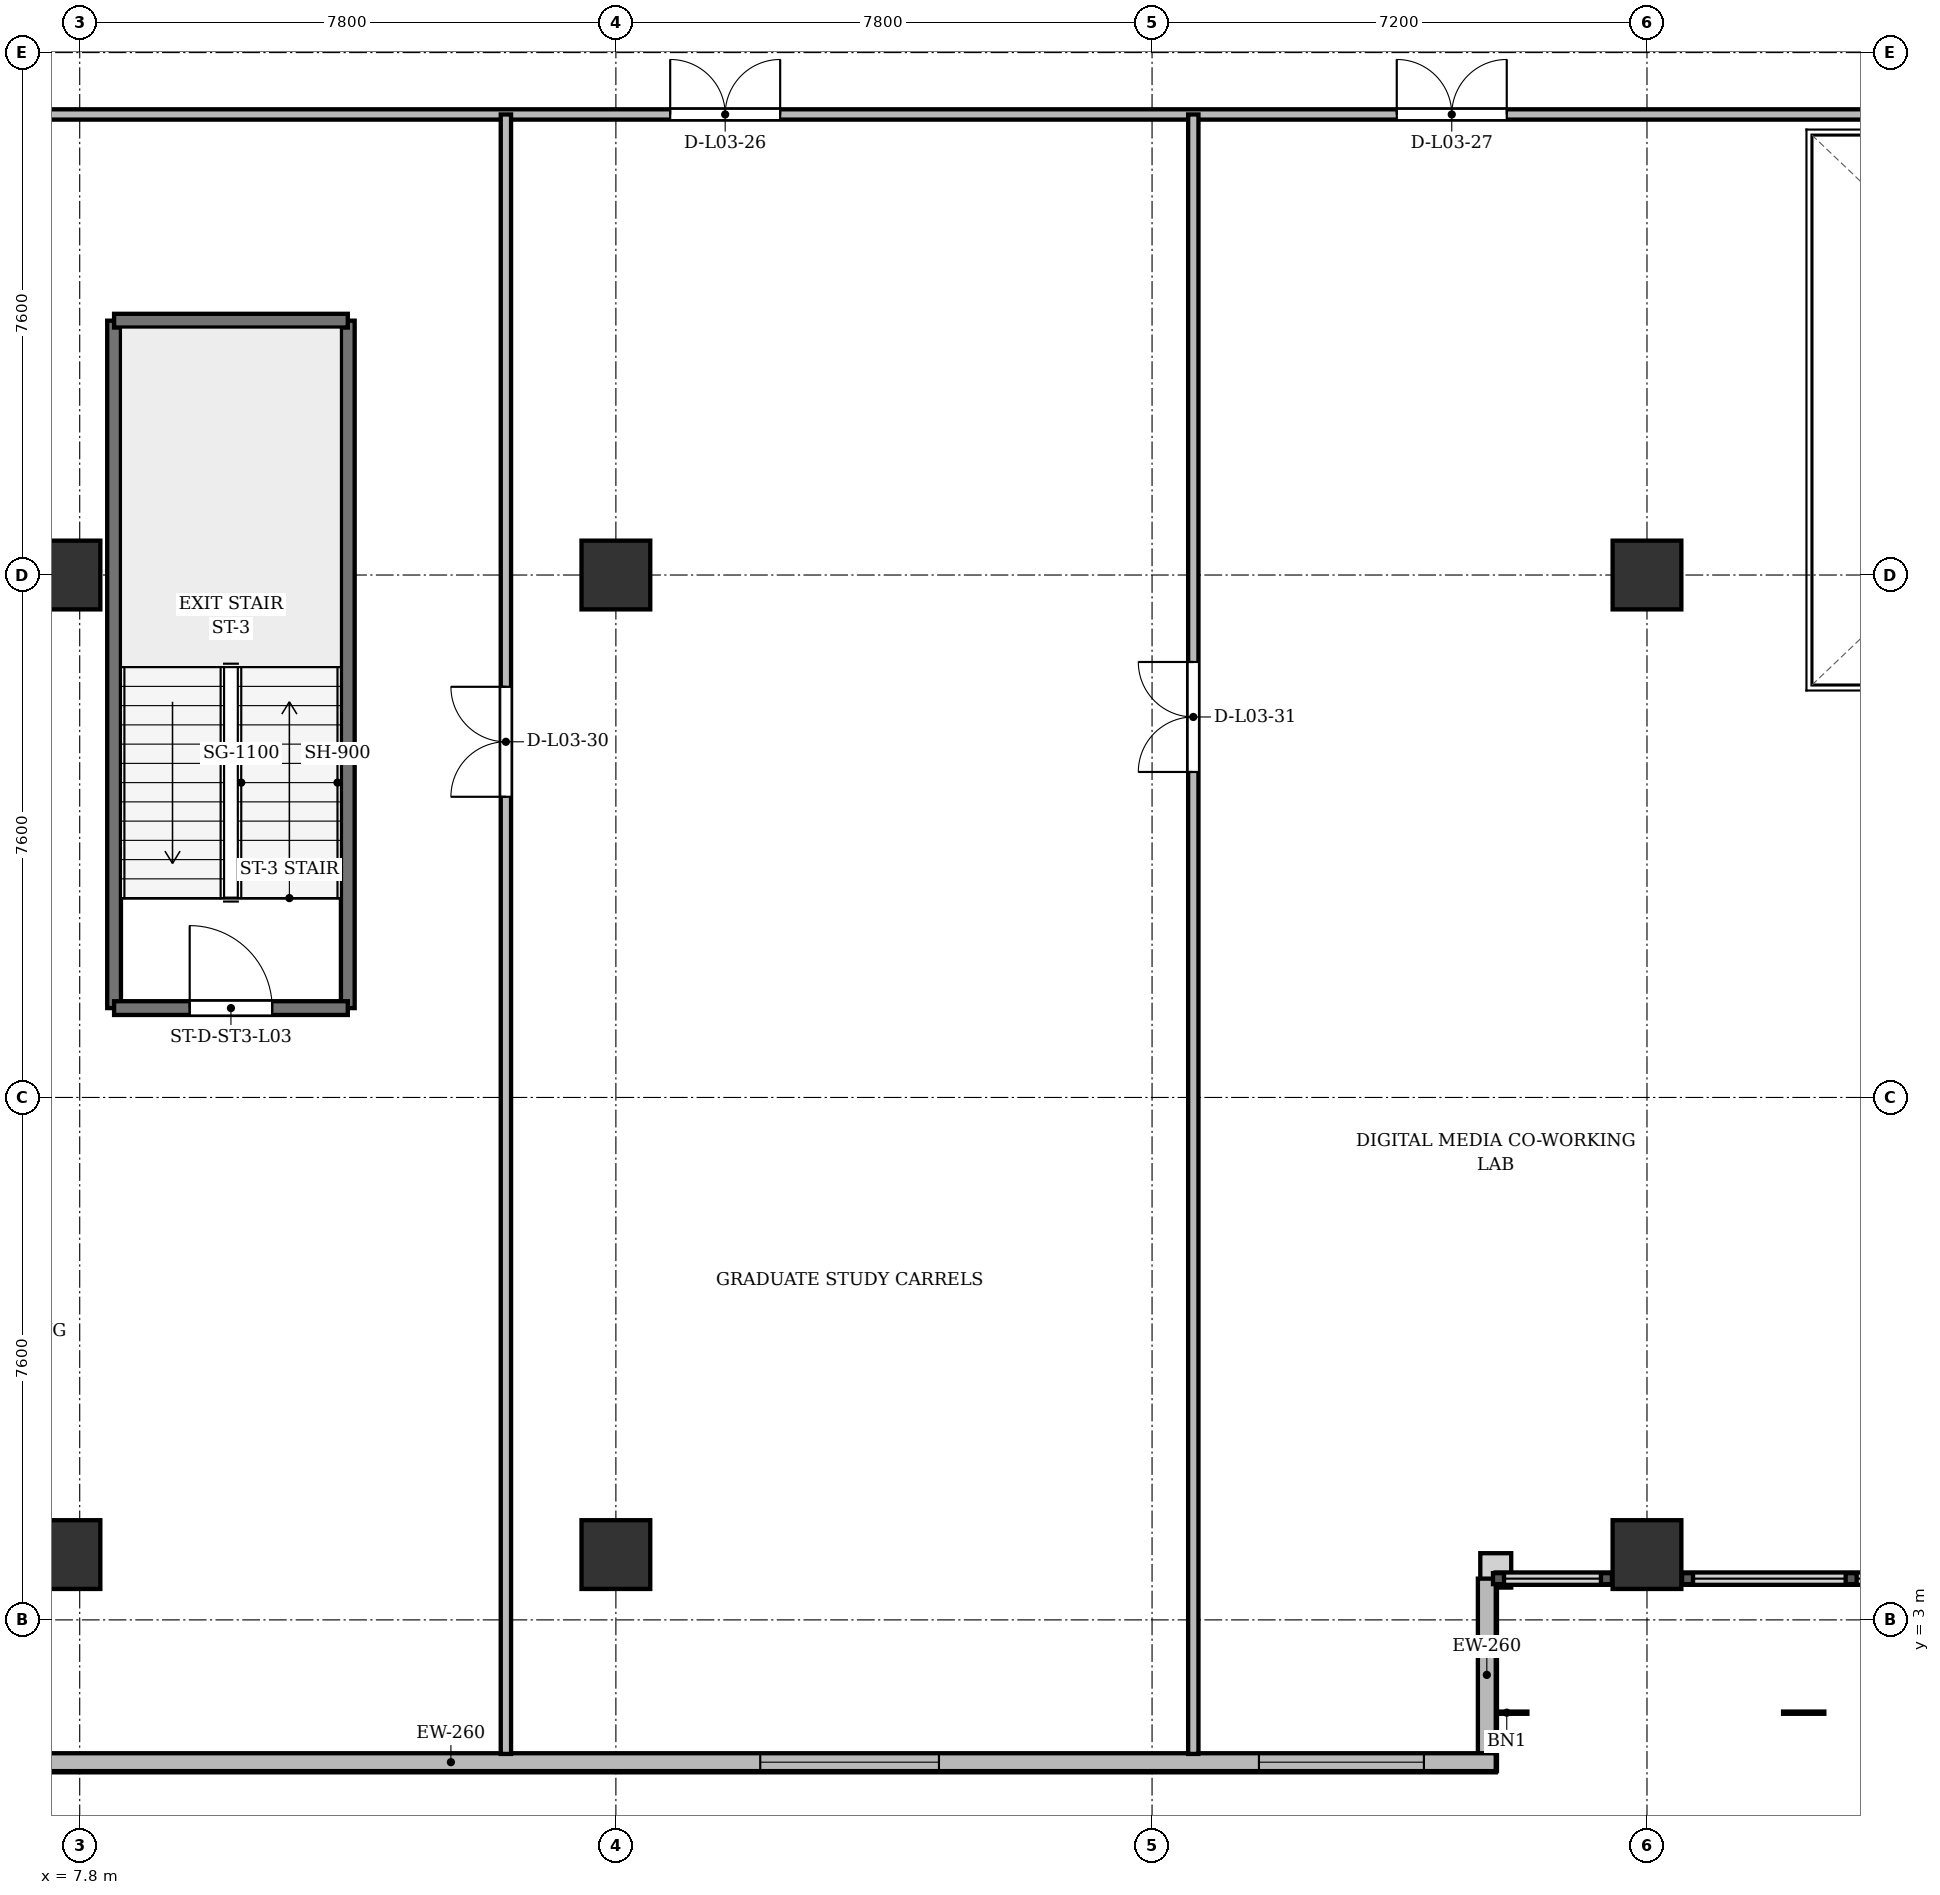
"""IFC4 building model, lengths in metres.
Left out: names, types, materials, properties, quantities, classifications, styles, units other than length and angle.
Written with IfcOpenShell. Run it as: python <this file> out.ifc"""

import sys

from ifc_helpers import new_model, si_unit, direction, frame, frame_2d, origin, origin_2d, place, context, subcontext, project, spatial, rectangle, extrude, source, transform, mapped, element, fill, save


model = new_model("IFC4")
c1 = context("Model", 3, precision=1e-05, world=origin(), true_north=direction((0.0, 1.0)))
c2 = subcontext(c1, "Body", "Model", "MODEL_VIEW")
j1 = project(units=[si_unit("LENGTHUNIT", "METRE"), si_unit("PLANEANGLEUNIT", "RADIAN")], contexts=[c1])
p1 = place(None, origin())
s1 = spatial("IfcSite", under=j1, at=p1, CompositionType="ELEMENT")
p2 = place(p1, origin())
s2 = spatial("IfcBuilding", under=s1, at=p2, CompositionType="ELEMENT")
p3 = place(p2, frame((0.0, 0.0, 14.2)))
s3 = spatial("IfcBuildingStorey", under=s2, at=p3, CompositionType="ELEMENT", Elevation=14.2)
m1 = source(origin(), c2, "Body", "SweptSolid", [
    extrude(rectangle(XDim=1.0, YDim=1.0, at=origin_2d()), origin(), (0.0, 0.0, 1.0), 4.5),
])
for number, where, z_axis, x_axis in (
    (1, (7.6, 3.95, 0.0), (0.0, 0.0, 1.0), (1.0, 0.0, 0.0)),
    (2, (7.6, 18.2, 0.0), (0.0, 0.0, 1.0), (1.0, 0.0, 0.0)),
    (3, (15.6, 3.95, 0.0), (0.0, 0.0, 1.0), (1.0, 0.0, 0.0)),
    (4, (15.6, 18.2, 0.0), (0.0, 0.0, 1.0), (1.0, 0.0, 0.0)),
    (5, (30.6, 3.95, 0.0), (0.0, 0.0, 1.0), (1.0, 0.0, 0.0)),
    (6, (30.6, 18.2, 0.0), (0.0, 0.0, 1.0), (1.0, 0.0, 0.0)),
):
    element("IfcColumn", number, at=place(p3, frame(where, z_axis=z_axis, x_axis=x_axis)), inside=s3, PredefinedType="COLUMN", context=c2, shape_type="MappedRepresentation", body=[
        mapped(m1, transform((0.0, 0.0, 0.0), x_axis=(1.0, 0.0, 0.0), y_axis=(0.0, 1.0, 0.0), z_axis=(0.0, 0.0, 1.0), scale=1.0)),
    ])
p4 = place(p3, frame((28.27, 3.6, 0.0), z_axis=(0.0, 0.0, 1.0), x_axis=(0.0, -1.0, 0.0)))
e7 = element("IfcWall", 7, at=p4, inside=s3, PredefinedType="SOLIDWALL", context=c2, shape_type="SweptSolid", body=[
    extrude(rectangle(XDim=2.8, YDim=0.26, at=frame_2d((1.4, 0.0))), origin(), (0.0, 0.0, 1.0), 4.15),
])
p5 = place(p3, frame((28.4, 0.93, 0.0), z_axis=(0.0, 0.0, 1.0), x_axis=(-1.0, 0.0, 0.0)))
e8 = element("IfcWall", 8, at=p5, inside=s3, PredefinedType="SOLIDWALL", context=c2, shape_type="SweptSolid", body=[
    extrude(rectangle(XDim=30.4, YDim=0.26, at=frame_2d((15.2, 0.0))), origin(), (0.0, 0.0, 1.0), 4.15),
])
p6 = place(p5, frame((1.045, 0.0, 0.9)))
e9 = element("IfcOpeningElement", 9, at=p6, cuts=e8, PredefinedType="OPENING", context=c2, shape_type="SweptSolid", body=[
    extrude(rectangle(XDim=2.4, YDim=2.1, at=frame_2d((1.2, 1.05))), frame((0.0, 0.14, 0.0), z_axis=(0.0, -1.0, 0.0), x_axis=(1.0, 0.0, 0.0)), (0.0, 0.0, 1.0), 0.28),
])
p7 = place(p5, frame((8.1, 0.0, 0.9)))
e10 = element("IfcOpeningElement", 10, at=p7, cuts=e8, PredefinedType="OPENING", context=c2, shape_type="SweptSolid", body=[
    extrude(rectangle(XDim=2.6, YDim=1.9, at=frame_2d((1.3, 0.95))), frame((0.0, 0.14, 0.0), z_axis=(0.0, -1.0, 0.0), x_axis=(1.0, 0.0, 0.0)), (0.0, 0.0, 1.0), 0.28),
])
p8 = place(p5, frame((21.155, 0.0, 0.9)))
e11 = element("IfcOpeningElement", 11, at=p8, cuts=e8, PredefinedType="OPENING", context=c2, shape_type="SweptSolid", body=[
    extrude(rectangle(XDim=2.4, YDim=2.1, at=frame_2d((1.2, 1.05))), frame((0.0, 0.14, 0.0), z_axis=(0.0, -1.0, 0.0), x_axis=(1.0, 0.0, 0.0)), (0.0, 0.0, 1.0), 0.28),
])
for number, where, z_axis, x_axis in (
    (12, (8.3, 11.9, 0.0), (0.0, 0.0, 1.0), (0.0, 1.0, 0.0)),
    (13, (11.7, 11.9, 0.0), (0.0, 0.0, 1.0), (0.0, 1.0, 0.0)),
):
    element("IfcWall", number, at=place(p3, frame(where, z_axis=z_axis, x_axis=x_axis)), inside=s3, PredefinedType="SHEAR", context=c2, shape_type="SweptSolid", body=[
        extrude(rectangle(XDim=10.0, YDim=0.2, at=frame_2d((5.0, 0.0))), origin(), (0.0, 0.0, 1.0), 4.15),
    ])
p9 = place(p3, frame((8.3, 11.9, 0.0), z_axis=(0.0, 0.0, 1.0), x_axis=(1.0, 0.0, 0.0)))
e14 = element("IfcWall", 14, at=p9, inside=s3, PredefinedType="SHEAR", context=c2, shape_type="SweptSolid", body=[
    extrude(rectangle(XDim=3.4, YDim=0.2, at=frame_2d((1.7, 0.0))), origin(), (0.0, 0.0, 1.0), 4.15),
])
p10 = place(p9, frame((1.1, 0.0, 0.0)))
e15 = element("IfcOpeningElement", 15, at=p10, cuts=e14, PredefinedType="OPENING", context=c2, shape_type="SweptSolid", body=[
    extrude(rectangle(XDim=1.2, YDim=2.15, at=frame_2d((0.6, 1.075))), frame((0.0, 0.11, 0.0), z_axis=(0.0, -1.0, 0.0), x_axis=(1.0, 0.0, 0.0)), (0.0, 0.0, 1.0), 0.22),
])
p11 = place(p3, frame((8.3, 21.9, 0.0), z_axis=(0.0, 0.0, 1.0), x_axis=(1.0, 0.0, 0.0)))
e16 = element("IfcWall", 16, at=p11, inside=s3, PredefinedType="SHEAR", context=c2, shape_type="SweptSolid", body=[
    extrude(rectangle(XDim=3.4, YDim=0.2, at=frame_2d((1.7, 0.0))), origin(), (0.0, 0.0, 1.0), 4.15),
])
p12 = place(p3, frame((-1.75, 24.9, 0.0), z_axis=(0.0, 0.0, 1.0), x_axis=(1.0, 0.0, 0.0)))
e17 = element("IfcWall", 17, at=p12, inside=s3, PredefinedType="PARTITIONING", context=c2, shape_type="SweptSolid", body=[
    extrude(rectangle(XDim=77.9, YDim=0.15, at=frame_2d((38.95, 0.0))), origin(), (0.0, 0.0, 1.0), 3.35),
])
p13 = place(p12, frame((1.952, 0.0, 0.0)))
e18 = element("IfcOpeningElement", 18, at=p13, cuts=e17, PredefinedType="OPENING", context=c2, shape_type="SweptSolid", body=[
    extrude(rectangle(XDim=1.6, YDim=2.2, at=frame_2d((0.8, 1.1))), frame((0.0, 0.085, 0.0), z_axis=(0.0, -1.0, 0.0), x_axis=(1.0, 0.0, 0.0)), (0.0, 0.0, 1.0), 0.17),
])
p14 = place(p12, frame((18.14, 0.0, 0.0)))
e19 = element("IfcOpeningElement", 19, at=p14, cuts=e17, PredefinedType="OPENING", context=c2, shape_type="SweptSolid", body=[
    extrude(rectangle(XDim=1.6, YDim=2.2, at=frame_2d((0.8, 1.1))), frame((0.0, 0.085, 0.0), z_axis=(0.0, -1.0, 0.0), x_axis=(1.0, 0.0, 0.0)), (0.0, 0.0, 1.0), 0.17),
])
p15 = place(p12, frame((28.71, 0.0, 0.0)))
e20 = element("IfcOpeningElement", 20, at=p15, cuts=e17, PredefinedType="OPENING", context=c2, shape_type="SweptSolid", body=[
    extrude(rectangle(XDim=1.6, YDim=2.2, at=frame_2d((0.8, 1.1))), frame((0.0, 0.085, 0.0), z_axis=(0.0, -1.0, 0.0), x_axis=(1.0, 0.0, 0.0)), (0.0, 0.0, 1.0), 0.17),
])
p16 = place(p12, frame((53.857, 0.0, 0.0)))
e21 = element("IfcOpeningElement", 21, at=p16, cuts=e17, PredefinedType="OPENING", context=c2, shape_type="SweptSolid", body=[
    extrude(rectangle(XDim=1.6, YDim=2.2, at=frame_2d((0.8, 1.1))), frame((0.0, 0.085, 0.0), z_axis=(0.0, -1.0, 0.0), x_axis=(1.0, 0.0, 0.0)), (0.0, 0.0, 1.0), 0.17),
])
p17 = place(p12, frame((74.351, 0.0, 0.0)))
e22 = element("IfcOpeningElement", 22, at=p17, cuts=e17, PredefinedType="OPENING", context=c2, shape_type="SweptSolid", body=[
    extrude(rectangle(XDim=1.6, YDim=2.2, at=frame_2d((0.8, 1.1))), frame((0.0, 0.085, 0.0), z_axis=(0.0, -1.0, 0.0), x_axis=(1.0, 0.0, 0.0)), (0.0, 0.0, 1.0), 0.17),
])
p18 = place(p3, frame((14.0, 1.05, 0.0), z_axis=(0.0, 0.0, 1.0), x_axis=(0.0, 1.0, 0.0)))
e23 = element("IfcWall", 23, at=p18, inside=s3, PredefinedType="PARTITIONING", context=c2, shape_type="SweptSolid", body=[
    extrude(rectangle(XDim=23.85, YDim=0.15, at=frame_2d((11.925, 0.0))), origin(), (0.0, 0.0, 1.0), 3.05),
])
p19 = place(p18, frame((13.924, 0.0, 0.0)))
e24 = element("IfcOpeningElement", 24, at=p19, cuts=e23, PredefinedType="OPENING", context=c2, shape_type="SweptSolid", body=[
    extrude(rectangle(XDim=1.6, YDim=2.2, at=frame_2d((0.8, 1.1))), frame((0.0, 0.085, 0.0), z_axis=(0.0, -1.0, 0.0), x_axis=(1.0, 0.0, 0.0)), (0.0, 0.0, 1.0), 0.17),
])
p20 = place(p3, frame((24.0, 1.05, 0.0), z_axis=(0.0, 0.0, 1.0), x_axis=(0.0, 1.0, 0.0)))
e25 = element("IfcWall", 25, at=p20, inside=s3, PredefinedType="PARTITIONING", context=c2, shape_type="SweptSolid", body=[
    extrude(rectangle(XDim=23.85, YDim=0.15, at=frame_2d((11.925, 0.0))), origin(), (0.0, 0.0, 1.0), 3.05),
])
p21 = place(p20, frame((14.285, 0.0, 0.0)))
e26 = element("IfcOpeningElement", 26, at=p21, cuts=e25, PredefinedType="OPENING", context=c2, shape_type="SweptSolid", body=[
    extrude(rectangle(XDim=1.6, YDim=2.2, at=frame_2d((0.8, 1.1))), frame((0.0, 0.085, 0.0), z_axis=(0.0, -1.0, 0.0), x_axis=(1.0, 0.0, 0.0)), (0.0, 0.0, 1.0), 0.17),
])
m2 = source(origin(), c2, "Body", "SweptSolid", [
    extrude(rectangle(XDim=2.4, YDim=2.1, at=frame_2d((1.2, 1.05))), frame((0.0, 0.03, 0.0), z_axis=(0.0, -1.0, 0.0), x_axis=(1.0, 0.0, 0.0)), (0.0, 0.0, 1.0), 0.06),
])
p22 = place(p6, origin())
e27 = element("IfcWindow", 27, at=p22, inside=s3, PartitioningType="SINGLE_PANEL", PredefinedType="WINDOW", context=c2, shape_type="MappedRepresentation", body=[
    mapped(m2, transform((0.0, 0.0, 0.0), x_axis=(1.0, 0.0, 0.0), y_axis=(0.0, 1.0, 0.0), z_axis=(0.0, 0.0, 1.0), scale=1.0)),
])
fill(e9, e27)
m3 = source(origin(), c2, "Body", "SweptSolid", [
    extrude(rectangle(XDim=2.6, YDim=1.9, at=frame_2d((1.3, 0.95))), frame((0.0, 0.03, 0.0), z_axis=(0.0, -1.0, 0.0), x_axis=(1.0, 0.0, 0.0)), (0.0, 0.0, 1.0), 0.06),
])
p23 = place(p7, origin())
e28 = element("IfcWindow", 28, at=p23, inside=s3, PartitioningType="SINGLE_PANEL", PredefinedType="WINDOW", context=c2, shape_type="MappedRepresentation", body=[
    mapped(m3, transform((0.0, 0.0, 0.0), x_axis=(1.0, 0.0, 0.0), y_axis=(0.0, 1.0, 0.0), z_axis=(0.0, 0.0, 1.0), scale=1.0)),
])
fill(e10, e28)
m4 = source(origin(), c2, "Body", "SweptSolid", [
    extrude(rectangle(XDim=1.2, YDim=2.15, at=frame_2d((0.6, 1.075))), frame((0.0, 0.025, 0.0), z_axis=(0.0, -1.0, 0.0), x_axis=(1.0, 0.0, 0.0)), (0.0, 0.0, 1.0), 0.05),
])
p24 = place(p10, origin())
e29 = element("IfcDoor", 29, at=p24, inside=s3, OperationType="SINGLE_SWING_LEFT", PredefinedType="DOOR", context=c2, shape_type="MappedRepresentation", body=[
    mapped(m4, transform((0.0, 0.0, 0.0), x_axis=(1.0, 0.0, 0.0), y_axis=(0.0, 1.0, 0.0), z_axis=(0.0, 0.0, 1.0), scale=1.0)),
])
fill(e15, e29)
m5 = source(origin(), c2, "Body", "SweptSolid", [
    extrude(rectangle(XDim=1.6, YDim=2.2, at=frame_2d((0.8, 1.1))), frame((0.0, 0.025, 0.0), z_axis=(0.0, -1.0, 0.0), x_axis=(1.0, 0.0, 0.0)), (0.0, 0.0, 1.0), 0.05),
])
p25 = place(p14, origin())
e30 = element("IfcDoor", 30, at=p25, inside=s3, OperationType="DOUBLE_DOOR_SINGLE_SWING", PredefinedType="DOOR", context=c2, shape_type="MappedRepresentation", body=[
    mapped(m5, transform((0.0, 0.0, 0.0), x_axis=(1.0, 0.0, 0.0), y_axis=(0.0, 1.0, 0.0), z_axis=(0.0, 0.0, 1.0), scale=1.0)),
])
fill(e19, e30)
p26 = place(p15, origin())
e31 = element("IfcDoor", 31, at=p26, inside=s3, OperationType="DOUBLE_DOOR_SINGLE_SWING", PredefinedType="DOOR", context=c2, shape_type="MappedRepresentation", body=[
    mapped(m5, transform((0.0, 0.0, 0.0), x_axis=(1.0, 0.0, 0.0), y_axis=(0.0, 1.0, 0.0), z_axis=(0.0, 0.0, 1.0), scale=1.0)),
])
fill(e20, e31)
p27 = place(p19, origin())
e32 = element("IfcDoor", 32, at=p27, inside=s3, OperationType="DOUBLE_DOOR_SINGLE_SWING", PredefinedType="DOOR", context=c2, shape_type="MappedRepresentation", body=[
    mapped(m5, transform((0.0, 0.0, 0.0), x_axis=(1.0, 0.0, 0.0), y_axis=(0.0, 1.0, 0.0), z_axis=(0.0, 0.0, 1.0), scale=1.0)),
])
fill(e24, e32)
p28 = place(p21, origin())
e33 = element("IfcDoor", 33, at=p28, inside=s3, OperationType="DOUBLE_DOOR_SINGLE_SWING", PredefinedType="DOOR", context=c2, shape_type="MappedRepresentation", body=[
    mapped(m5, transform((0.0, 0.0, 0.0), x_axis=(1.0, 0.0, 0.0), y_axis=(0.0, 1.0, 0.0), z_axis=(0.0, 0.0, 1.0), scale=1.0)),
])
fill(e26, e33)
save(model, sys.argv[1])
